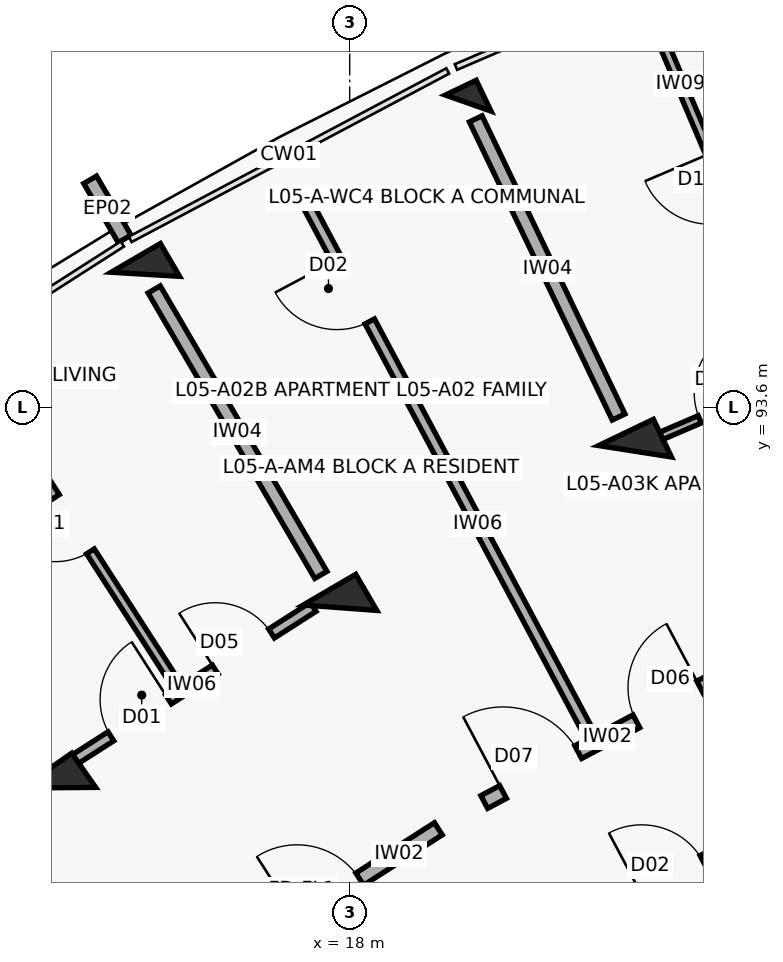
"""IFC4 building model, lengths in metres.
Left out: names, types, materials, properties, quantities, classifications, styles, units other than length and angle.
Written with IfcOpenShell. Run it as: python <this file> out.ifc"""

import sys

from ifc_helpers import new_model, si_unit, direction, frame, frame_2d, origin, origin_2d, place, context, subcontext, project, spatial, rectangle, extrude, element, fill, save


model = new_model("IFC4")
c1 = context("Model", 3, precision=1e-05, world=origin(), true_north=direction((0.0, 1.0)))
c2 = subcontext(c1, "Body", "Model", "MODEL_VIEW")
j1 = project(units=[si_unit("LENGTHUNIT", "METRE"), si_unit("PLANEANGLEUNIT", "RADIAN")], contexts=[c1])
p1 = place(None, origin())
s1 = spatial("IfcSite", under=j1, at=p1, CompositionType="ELEMENT")
p2 = place(p1, origin())
s2 = spatial("IfcBuilding", under=s1, at=p2, CompositionType="ELEMENT")
p3 = place(p2, frame((0.0, 0.0, 17.4)))
s3 = spatial("IfcBuildingStorey", under=s2, at=p3, CompositionType="ELEMENT", Elevation=17.4)
for number, where, z_axis, x_axis in (
    (1, (14.172, 88.592, 0.0), (0.0, 0.0, 1.0), (-0.573, 0.82, 0.0)),
    (2, (17.873, 90.96, 0.0), (0.0, 0.0, 1.0), (-0.504, 0.864, 0.0)),
):
    element("IfcColumn", number, at=place(p3, frame(where, z_axis=z_axis, x_axis=x_axis)), inside=s3, PredefinedType="COLUMN", context=c2, shape_type="SweptSolid", body=[
        extrude(rectangle(XDim=0.55, YDim=0.8, at=origin_2d()), origin(), (0.0, 0.0, 1.0), 3.1),
    ])
p4 = place(p3, frame((15.311, 95.347, 0.0), z_axis=(0.0, 0.0, 1.0), x_axis=(-0.504226211181, 0.863571611366, 0.0)))
e3 = element("IfcColumn", 3, at=p4, inside=s3, PredefinedType="COLUMN", context=c2, shape_type="SweptSolid", body=[
    extrude(rectangle(XDim=0.5, YDim=0.75, at=origin_2d()), origin(), (0.0, 0.0, 1.0), 3.1),
])
p5 = place(p3, frame((21.754, 93.019, 0.0), z_axis=(0.0, 0.0, 1.0), x_axis=(-0.432085748802, 0.901832526405, 0.0)))
e4 = element("IfcColumn", 4, at=p5, inside=s3, PredefinedType="COLUMN", context=c2, shape_type="SweptSolid", body=[
    extrude(rectangle(XDim=0.55, YDim=0.8, at=origin_2d()), origin(), (0.0, 0.0, 1.0), 3.1),
])
p6 = place(p3, frame((19.559, 97.6, 0.0), z_axis=(0.0, 0.0, 1.0), x_axis=(-0.432085748802, 0.901832526405, 0.0)))
e5 = element("IfcColumn", 5, at=p6, inside=s3, PredefinedType="COLUMN", context=c2, shape_type="SweptSolid", body=[
    extrude(rectangle(XDim=0.45, YDim=0.45, at=origin_2d()), origin(), (0.0, 0.0, 1.0), 3.1),
])
p7 = place(p3, frame((15.039, 95.813, 0.0), z_axis=(0.0, 0.0, 1.0), x_axis=(-0.504326383773, 0.863513114336, 0.0)))
e6 = element("IfcWall", 6, at=p7, inside=s3, PredefinedType="PARAPET", context=c2, shape_type="SweptSolid", body=[
    extrude(rectangle(XDim=0.9, YDim=0.195, at=frame_2d((0.45, 0.0))), origin(), (0.0, 0.0, 1.0), 2.25),
])
p8 = place(p3, frame((16.272, 86.199, 0.0), z_axis=(0.0, 0.0, 1.0), x_axis=(0.842257205985, 0.539075874963, 0.0)))
e7 = element("IfcWall", 7, at=p8, inside=s3, PredefinedType="SOLIDWALL", context=c2, shape_type="SweptSolid", body=[
    extrude(rectangle(XDim=3.436, YDim=0.19, at=frame_2d((1.718, 0.0))), origin(), (0.0, 0.0, 1.0), 2.08),
])
p9 = place(p8, frame((1.228, 0.0, 0.0)))
e8 = element("IfcOpeningElement", 8, at=p9, cuts=e7, PredefinedType="OPENING", context=c2, shape_type="SweptSolid", body=[
    extrude(rectangle(XDim=0.98, YDim=2.15, at=frame_2d((0.49, 1.075))), frame((0.0, 0.105, 0.0), z_axis=(0.0, -1.0, 0.0), x_axis=(1.0, 0.0, 0.0)), (0.0, 0.0, 1.0), 0.21),
])
p10 = place(p3, frame((14.311, 88.917, 0.0), z_axis=(0.0, 0.0, 1.0), x_axis=(0.842238809758, 0.53910461632, 0.0)))
e9 = element("IfcWall", 9, at=p10, inside=s3, PredefinedType="PARTITIONING", context=c2, shape_type="SweptSolid", body=[
    extrude(rectangle(XDim=3.81, YDim=0.14, at=frame_2d((1.905, 0.0))), origin(), (0.0, 0.0, 1.0), 2.08),
])
p11 = place(p10, frame((0.65, 0.0, 0.0)))
e10 = element("IfcOpeningElement", 10, at=p11, cuts=e9, PredefinedType="OPENING", context=c2, shape_type="SweptSolid", body=[
    extrude(rectangle(XDim=0.9, YDim=2.1, at=frame_2d((0.45, 1.05))), frame((0.0, 0.08, 0.0), z_axis=(0.0, -1.0, 0.0), x_axis=(1.0, 0.0, 0.0)), (0.0, 0.0, 1.0), 0.16),
])
p12 = place(p10, frame((2.28, 0.0, 0.0)))
e11 = element("IfcOpeningElement", 11, at=p12, cuts=e9, PredefinedType="OPENING", context=c2, shape_type="SweptSolid", body=[
    extrude(rectangle(XDim=0.88, YDim=2.1, at=frame_2d((0.44, 1.05))), frame((0.0, 0.08, 0.0), z_axis=(0.0, -1.0, 0.0), x_axis=(1.0, 0.0, 0.0)), (0.0, 0.0, 1.0), 0.16),
])
p13 = place(p3, frame((15.645, 90.062, 0.0), z_axis=(0.0, 0.0, 1.0), x_axis=(-0.541596414291, 0.840638640574, 0.0)))
e12 = element("IfcWall", 12, at=p13, inside=s3, PredefinedType="PARTITIONING", context=c2, shape_type="SweptSolid", body=[
    extrude(rectangle(XDim=4.75, YDim=0.12, at=frame_2d((2.375, 0.0))), origin(), (0.0, 0.0, 1.0), 2.08),
])
p14 = place(p13, frame((1.95, 0.0, 0.0)))
e13 = element("IfcOpeningElement", 13, at=p14, cuts=e12, PredefinedType="OPENING", context=c2, shape_type="SweptSolid", body=[
    extrude(rectangle(XDim=0.85, YDim=2.1, at=frame_2d((0.425, 1.05))), frame((0.0, 0.07, 0.0), z_axis=(0.0, -1.0, 0.0), x_axis=(1.0, 0.0, 0.0)), (0.0, 0.0, 1.0), 0.14),
])
p15 = place(p3, frame((19.77, 88.404, 0.0), z_axis=(0.0, 0.0, 1.0), x_axis=(0.883410853063, 0.468599258099, 0.0)))
e14 = element("IfcWall", 14, at=p15, inside=s3, PredefinedType="SOLIDWALL", context=c2, shape_type="SweptSolid", body=[
    extrude(rectangle(XDim=3.436, YDim=0.19, at=frame_2d((1.718, 0.0))), origin(), (0.0, 0.0, 1.0), 2.08),
])
p16 = place(p15, frame((0.28, 0.0, 0.0)))
e15 = element("IfcOpeningElement", 15, at=p16, cuts=e14, PredefinedType="OPENING", context=c2, shape_type="SweptSolid", body=[
    extrude(rectangle(XDim=1.12, YDim=2.15, at=frame_2d((0.56, 1.075))), frame((0.0, 0.105, 0.0), z_axis=(0.0, -1.0, 0.0), x_axis=(1.0, 0.0, 0.0)), (0.0, 0.0, 1.0), 0.21),
])
p17 = place(p15, frame((2.266, 0.0, 0.0)))
e16 = element("IfcOpeningElement", 16, at=p17, cuts=e14, PredefinedType="OPENING", context=c2, shape_type="SweptSolid", body=[
    extrude(rectangle(XDim=0.95, YDim=2.1, at=frame_2d((0.475, 1.05))), frame((0.0, 0.105, 0.0), z_axis=(0.0, -1.0, 0.0), x_axis=(1.0, 0.0, 0.0)), (0.0, 0.0, 1.0), 0.21),
])
p18 = place(p3, frame((20.804, 86.634, 0.0), z_axis=(0.0, 0.0, 1.0), x_axis=(0.883444301944, 0.468536194293, 0.0)))
e17 = element("IfcWall", 17, at=p18, inside=s3, PredefinedType="SOLIDWALL", context=c2, shape_type="SweptSolid", body=[
    extrude(rectangle(XDim=3.269, YDim=0.19, at=frame_2d((1.634, 0.0))), origin(), (0.0, 0.0, 1.0), 2.08),
])
p19 = place(p18, frame((1.174, 0.0, 0.0)))
e18 = element("IfcOpeningElement", 18, at=p19, cuts=e17, PredefinedType="OPENING", context=c2, shape_type="SweptSolid", body=[
    extrude(rectangle(XDim=0.92, YDim=2.1, at=frame_2d((0.46, 1.05))), frame((0.0, 0.105, 0.0), z_axis=(0.0, -1.0, 0.0), x_axis=(1.0, 0.0, 0.0)), (0.0, 0.0, 1.0), 0.21),
])
p20 = place(p3, frame((21.107, 89.387, 0.0), z_axis=(0.0, 0.0, 1.0), x_axis=(-0.469891538074, 0.882724159886, 0.0)))
e19 = element("IfcWall", 19, at=p20, inside=s3, PredefinedType="PARTITIONING", context=c2, shape_type="SweptSolid", body=[
    extrude(rectangle(XDim=7.95, YDim=0.14, at=frame_2d((3.975, 0.0))), origin(), (0.0, 0.0, 1.0), 2.08),
])
p21 = place(p20, frame((6.05, 0.0, 0.0)))
e20 = element("IfcOpeningElement", 20, at=p21, cuts=e19, PredefinedType="OPENING", context=c2, shape_type="SweptSolid", body=[
    extrude(rectangle(XDim=0.92, YDim=2.1, at=frame_2d((0.46, 1.05))), frame((0.0, 0.08, 0.0), z_axis=(0.0, -1.0, 0.0), x_axis=(1.0, 0.0, 0.0)), (0.0, 0.0, 1.0), 0.16),
])
p22 = place(p3, frame((17.621, 91.392, 0.0), z_axis=(0.0, 0.0, 1.0), x_axis=(-0.504216452091, 0.863577309475, 0.0)))
e21 = element("IfcWall", 21, at=p22, inside=s3, PredefinedType="SOLIDWALL", context=c2, shape_type="SweptSolid", body=[
    extrude(rectangle(XDim=4.35, YDim=0.185, at=frame_2d((2.175, 0.0))), origin(), (0.0, 0.0, 1.0), 2.08),
])
p23 = place(p3, frame((22.008, 93.182, 0.0), z_axis=(0.0, 0.0, 1.0), x_axis=(0.918732171064, 0.394881245253, 0.0)))
e22 = element("IfcWall", 22, at=p23, inside=s3, PredefinedType="PARTITIONING", context=c2, shape_type="SweptSolid", body=[
    extrude(rectangle(XDim=3.797, YDim=0.105, at=frame_2d((1.899, 0.0))), origin(), (0.0, 0.0, 1.0), 2.08),
])
p24 = place(p23, frame((0.65, 0.0, 0.0)))
e23 = element("IfcOpeningElement", 23, at=p24, cuts=e22, PredefinedType="OPENING", context=c2, shape_type="SweptSolid", body=[
    extrude(rectangle(XDim=0.9, YDim=2.1, at=frame_2d((0.45, 1.05))), frame((0.0, 0.062, 0.0), z_axis=(0.0, -1.0, 0.0), x_axis=(1.0, 0.0, 0.0)), (0.0, 0.0, 1.0), 0.125),
])
p25 = place(p23, frame((2.267, 0.0, 0.0)))
e24 = element("IfcOpeningElement", 24, at=p25, cuts=e22, PredefinedType="OPENING", context=c2, shape_type="SweptSolid", body=[
    extrude(rectangle(XDim=0.88, YDim=2.1, at=frame_2d((0.44, 1.05))), frame((0.0, 0.062, 0.0), z_axis=(0.0, -1.0, 0.0), x_axis=(1.0, 0.0, 0.0)), (0.0, 0.0, 1.0), 0.125),
])
p26 = place(p3, frame((23.88, 94.253, 0.0), z_axis=(0.0, 0.0, 1.0), x_axis=(-0.39076607415, 0.920490019116, 0.0)))
e25 = element("IfcWall", 25, at=p26, inside=s3, PredefinedType="PARTITIONING", context=c2, shape_type="SweptSolid", body=[
    extrude(rectangle(XDim=4.9, YDim=0.12, at=frame_2d((2.45, 0.0))), origin(), (0.0, 0.0, 1.0), 2.08),
])
p27 = place(p26, frame((1.985, 0.0, 0.0)))
e26 = element("IfcOpeningElement", 26, at=p27, cuts=e25, PredefinedType="OPENING", context=c2, shape_type="SweptSolid", body=[
    extrude(rectangle(XDim=0.93, YDim=2.1, at=frame_2d((0.465, 1.05))), frame((0.0, 0.07, 0.0), z_axis=(0.0, -1.0, 0.0), x_axis=(1.0, 0.0, 0.0)), (0.0, 0.0, 1.0), 0.14),
])
p28 = place(p3, frame((21.538, 93.469, 0.0), z_axis=(0.0, 0.0, 1.0), x_axis=(-0.432086898897, 0.901831975371, 0.0)))
e27 = element("IfcWall", 27, at=p28, inside=s3, PredefinedType="SOLIDWALL", context=c2, shape_type="SweptSolid", body=[
    extrude(rectangle(XDim=4.35, YDim=0.185, at=frame_2d((2.175, 0.0))), origin(), (0.0, 0.0, 1.0), 2.08),
])
p29 = place(p9, origin())
e28 = element("IfcDoor", 28, at=p29, inside=s3, OperationType="SINGLE_SWING_LEFT", PredefinedType="DOOR", context=c2, shape_type="SweptSolid", body=[
    extrude(rectangle(XDim=0.98, YDim=2.15, at=frame_2d((0.49, 1.075))), frame((0.0, 0.025, 0.0), z_axis=(0.0, -1.0, 0.0), x_axis=(1.0, 0.0, 0.0)), (0.0, 0.0, 1.0), 0.05),
])
fill(e8, e28)
p30 = place(p11, origin())
e29 = element("IfcDoor", 29, at=p30, inside=s3, OperationType="SINGLE_SWING_RIGHT", PredefinedType="DOOR", context=c2, shape_type="SweptSolid", body=[
    extrude(rectangle(XDim=0.9, YDim=2.1, at=frame_2d((0.45, 1.05))), frame((0.0, 0.025, 0.0), z_axis=(0.0, -1.0, 0.0), x_axis=(1.0, 0.0, 0.0)), (0.0, 0.0, 1.0), 0.05),
])
fill(e10, e29)
p31 = place(p12, origin())
e30 = element("IfcDoor", 30, at=p31, inside=s3, OperationType="SINGLE_SWING_LEFT", PredefinedType="DOOR", context=c2, shape_type="SweptSolid", body=[
    extrude(rectangle(XDim=0.88, YDim=2.1, at=frame_2d((0.44, 1.05))), frame((0.0, 0.025, 0.0), z_axis=(0.0, -1.0, 0.0), x_axis=(1.0, 0.0, 0.0)), (0.0, 0.0, 1.0), 0.05),
])
fill(e11, e30)
p32 = place(p14, origin())
e31 = element("IfcDoor", 31, at=p32, inside=s3, OperationType="SINGLE_SWING_RIGHT", PredefinedType="DOOR", context=c2, shape_type="SweptSolid", body=[
    extrude(rectangle(XDim=0.85, YDim=2.1, at=frame_2d((0.425, 1.05))), frame((0.0, 0.025, 0.0), z_axis=(0.0, -1.0, 0.0), x_axis=(1.0, 0.0, 0.0)), (0.0, 0.0, 1.0), 0.05),
])
fill(e13, e31)
p33 = place(p16, origin())
e32 = element("IfcDoor", 32, at=p33, inside=s3, OperationType="SINGLE_SWING_LEFT", PredefinedType="DOOR", context=c2, shape_type="SweptSolid", body=[
    extrude(rectangle(XDim=1.12, YDim=2.15, at=frame_2d((0.56, 1.075))), frame((0.0, 0.025, 0.0), z_axis=(0.0, -1.0, 0.0), x_axis=(1.0, 0.0, 0.0)), (0.0, 0.0, 1.0), 0.05),
])
fill(e15, e32)
p34 = place(p17, origin())
e33 = element("IfcDoor", 33, at=p34, inside=s3, OperationType="SINGLE_SWING_RIGHT", PredefinedType="DOOR", context=c2, shape_type="SweptSolid", body=[
    extrude(rectangle(XDim=0.95, YDim=2.1, at=frame_2d((0.475, 1.05))), frame((0.0, 0.025, 0.0), z_axis=(0.0, -1.0, 0.0), x_axis=(1.0, 0.0, 0.0)), (0.0, 0.0, 1.0), 0.05),
])
fill(e16, e33)
p35 = place(p19, origin())
e34 = element("IfcDoor", 34, at=p35, inside=s3, OperationType="SINGLE_SWING_LEFT", PredefinedType="DOOR", context=c2, shape_type="SweptSolid", body=[
    extrude(rectangle(XDim=0.92, YDim=2.1, at=frame_2d((0.46, 1.05))), frame((0.0, 0.025, 0.0), z_axis=(0.0, -1.0, 0.0), x_axis=(1.0, 0.0, 0.0)), (0.0, 0.0, 1.0), 0.05),
])
fill(e18, e34)
p36 = place(p21, origin())
e35 = element("IfcDoor", 35, at=p36, inside=s3, OperationType="SINGLE_SWING_RIGHT", PredefinedType="DOOR", context=c2, shape_type="SweptSolid", body=[
    extrude(rectangle(XDim=0.92, YDim=2.1, at=frame_2d((0.46, 1.05))), frame((0.0, 0.025, 0.0), z_axis=(0.0, -1.0, 0.0), x_axis=(1.0, 0.0, 0.0)), (0.0, 0.0, 1.0), 0.05),
])
fill(e20, e35)
p37 = place(p24, origin())
e36 = element("IfcDoor", 36, at=p37, inside=s3, OperationType="SINGLE_SWING_RIGHT", PredefinedType="DOOR", context=c2, shape_type="SweptSolid", body=[
    extrude(rectangle(XDim=0.9, YDim=2.1, at=frame_2d((0.45, 1.05))), frame((0.0, 0.025, 0.0), z_axis=(0.0, -1.0, 0.0), x_axis=(1.0, 0.0, 0.0)), (0.0, 0.0, 1.0), 0.05),
])
fill(e23, e36)
save(model, sys.argv[1])
